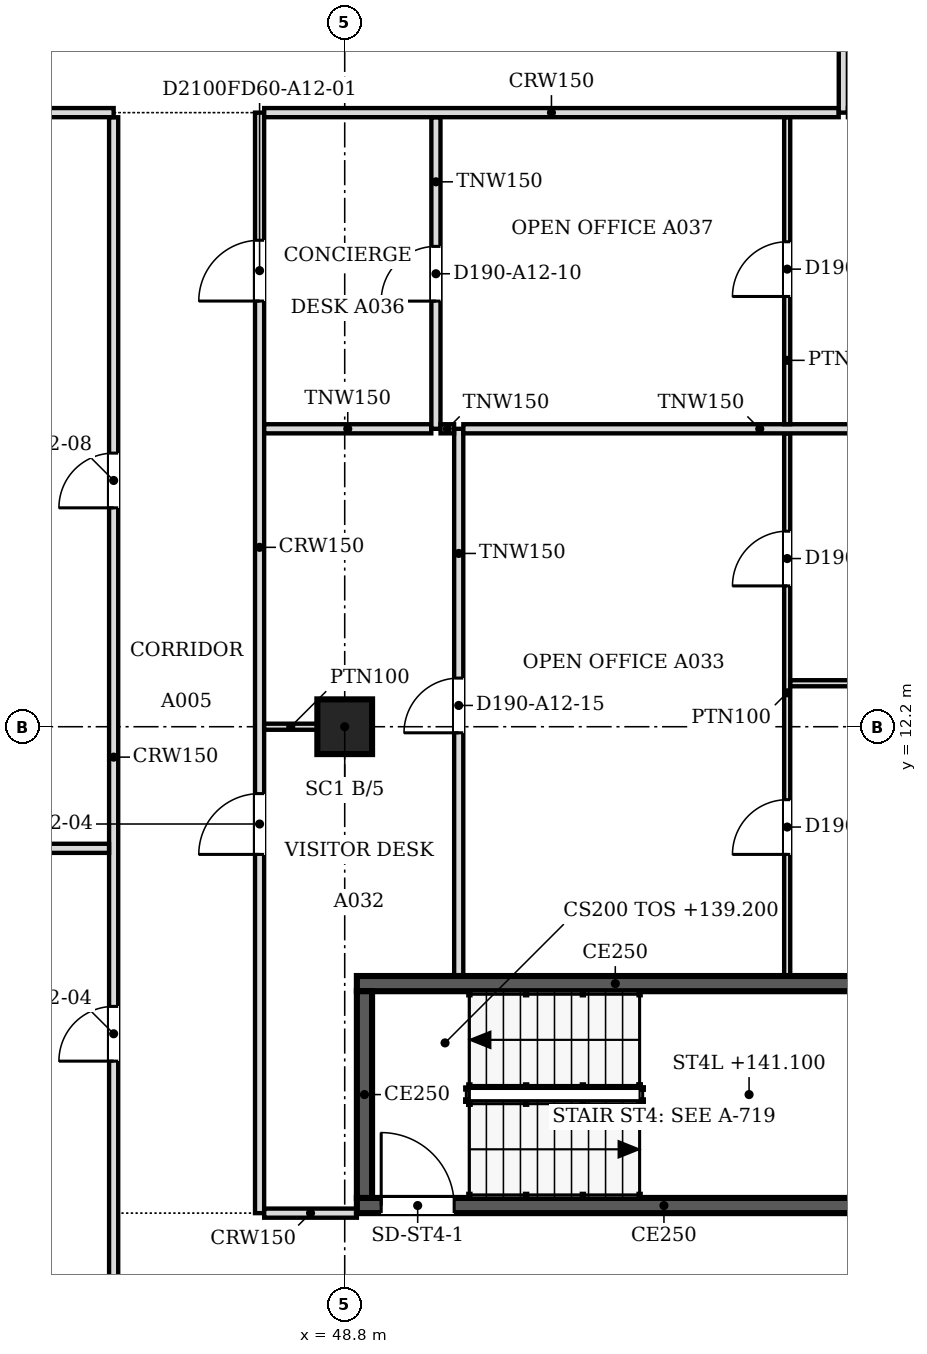
"""IFC4 building model, lengths in metres.
Left out: names, types, materials, properties, quantities, classifications, styles, units other than length and angle.
Written with IfcOpenShell. Run it as: python <this file> out.ifc"""

import sys

from ifc_helpers import new_model, si_unit, direction, frame, frame_2d, origin, origin_2d, place, context, subcontext, project, spatial, rectangle, extrude, source, transform, mapped, element, fill, save


model = new_model("IFC4")
c1 = context("Model", 3, precision=1e-05, world=origin(), true_north=direction((0.0, 1.0)))
c2 = subcontext(c1, "Body", "Model", "MODEL_VIEW")
j1 = project(units=[si_unit("LENGTHUNIT", "METRE"), si_unit("PLANEANGLEUNIT", "RADIAN")], contexts=[c1])
p1 = place(None, origin())
s1 = spatial("IfcSite", under=j1, at=p1, CompositionType="ELEMENT")
p2 = place(p1, origin())
s2 = spatial("IfcBuilding", under=s1, at=p2, CompositionType="ELEMENT")
p3 = place(p2, frame((0.0, 0.0, 139.2)))
s3 = spatial("IfcBuildingStorey", under=s2, at=p3, CompositionType="ELEMENT", Elevation=139.2)
p4 = place(p3, frame((48.8, 12.2, 0.0), z_axis=(0.0, 0.0, 1.0), x_axis=(1.0, 0.0, 0.0)))
e1 = element("IfcColumn", 1, at=p4, inside=s3, PredefinedType="COLUMN", context=c2, shape_type="SweptSolid", body=[
    extrude(rectangle(XDim=0.9, YDim=0.9, at=origin_2d()), origin(), (0.0, 0.0, 1.0), 3.6),
])
p5 = place(p3, frame((57.5, 4.325, 0.0), z_axis=(0.0, 0.0, 1.0), x_axis=(-1.0, 0.0, 0.0)))
e2 = element("IfcWall", 2, at=p5, inside=s3, PredefinedType="SOLIDWALL", context=c2, shape_type="SweptSolid", body=[
    extrude(rectangle(XDim=8.5, YDim=0.25, at=frame_2d((4.25, 0.0))), origin(), (0.0, 0.0, 1.0), 3.8),
])
m1 = source(origin(), c2, "Body", "SweptSolid", [
    extrude(rectangle(XDim=1.2, YDim=2.1, at=frame_2d((0.6, 1.05))), frame((0.0, 0.135, 0.0), z_axis=(0.0, -1.0, 0.0), x_axis=(1.0, 0.0, 0.0)), (0.0, 0.0, 1.0), 0.27),
])
p6 = place(p5, frame((6.9, 0.0, 0.0)))
e3 = element("IfcOpeningElement", 3, at=p6, cuts=e2, PredefinedType="OPENING", context=c2, shape_type="MappedRepresentation", body=[
    mapped(m1, transform((0.0, 0.0, 0.0), scale=1.0)),
])
p7 = place(p3, frame((49.125, 4.45, 0.0), z_axis=(0.0, 0.0, 1.0), x_axis=(0.0, 1.0, 0.0)))
e4 = element("IfcWall", 4, at=p7, inside=s3, PredefinedType="SOLIDWALL", context=c2, shape_type="SweptSolid", body=[
    extrude(rectangle(XDim=3.4, YDim=0.25, at=frame_2d((1.7, 0.0))), origin(), (0.0, 0.0, 1.0), 3.8),
])
p8 = place(p3, frame((49.0, 7.975, 0.0), z_axis=(0.0, 0.0, 1.0), x_axis=(1.0, 0.0, 0.0)))
e5 = element("IfcWall", 5, at=p8, inside=s3, PredefinedType="SOLIDWALL", context=c2, shape_type="SweptSolid", body=[
    extrude(rectangle(XDim=8.5, YDim=0.25, at=frame_2d((4.25, 0.0))), origin(), (0.0, 0.0, 1.0), 3.8),
])
p9 = place(p3, frame((45.0, 0.5, 0.0), z_axis=(0.0, 0.0, 1.0), x_axis=(0.0, 1.0, 0.0)))
e6 = element("IfcWall", 6, at=p9, inside=s3, PredefinedType="PARTITIONING", context=c2, shape_type="SweptSolid", body=[
    extrude(rectangle(XDim=21.724, YDim=0.15, at=frame_2d((10.862, 0.0))), origin(), (0.0, 0.0, 1.0), 3.067),
])
m2 = source(origin(), c2, "Body", "SweptSolid", [
    extrude(rectangle(XDim=0.9, YDim=2.1, at=frame_2d((0.45, 1.05))), frame((0.0, 0.085, 0.0), z_axis=(0.0, -1.0, 0.0), x_axis=(1.0, 0.0, 0.0)), (0.0, 0.0, 1.0), 0.17),
])
p10 = place(p9, frame((6.2, 0.0, 0.0)))
e7 = element("IfcOpeningElement", 7, at=p10, cuts=e6, PredefinedType="OPENING", context=c2, shape_type="MappedRepresentation", body=[
    mapped(m2, transform((0.0, 0.0, 0.0), scale=1.0)),
])
p11 = place(p9, frame((15.3, 0.0, 0.0)))
e8 = element("IfcOpeningElement", 8, at=p11, cuts=e6, PredefinedType="OPENING", context=c2, shape_type="MappedRepresentation", body=[
    mapped(m2, transform((0.0, 0.0, 0.0), scale=1.0)),
])
p12 = place(p3, frame((47.4, 22.3, 0.0), z_axis=(0.0, 0.0, 1.0), x_axis=(0.0, -1.0, 0.0)))
e9 = element("IfcWall", 9, at=p12, inside=s3, PredefinedType="PARTITIONING", context=c2, shape_type="SweptSolid", body=[
    extrude(rectangle(XDim=18.1, YDim=0.15, at=frame_2d((9.05, 0.0))), origin(), (0.0, 0.0, 1.0), 3.067),
])
m3 = source(origin(), c2, "Body", "SweptSolid", [
    extrude(rectangle(XDim=1.0, YDim=2.1, at=frame_2d((0.5, 1.05))), frame((0.0, 0.085, 0.0), z_axis=(0.0, -1.0, 0.0), x_axis=(1.0, 0.0, 0.0)), (0.0, 0.0, 1.0), 0.17),
])
p13 = place(p12, frame((2.099, 0.0, 0.0)))
e10 = element("IfcOpeningElement", 10, at=p13, cuts=e9, PredefinedType="OPENING", context=c2, shape_type="MappedRepresentation", body=[
    mapped(m3, transform((0.0, 0.0, 0.0), scale=1.0)),
])
p14 = place(p12, frame((11.2, 0.0, 0.0)))
e11 = element("IfcOpeningElement", 11, at=p14, cuts=e9, PredefinedType="OPENING", context=c2, shape_type="MappedRepresentation", body=[
    mapped(m3, transform((0.0, 0.0, 0.0), scale=1.0)),
])
p15 = place(p3, frame((47.476, 4.2, 0.0), z_axis=(0.0, 0.0, 1.0), x_axis=(1.0, 0.0, 0.0)))
e12 = element("IfcWall", 12, at=p15, inside=s3, PredefinedType="PARTITIONING", context=c2, shape_type="SweptSolid", body=[
    extrude(rectangle(XDim=1.524, YDim=0.15, at=frame_2d((0.762, 0.0))), origin(), (0.0, 0.0, 1.0), 3.067),
])
p16 = place(p3, frame((50.675, 17.1, 0.0), z_axis=(0.0, 0.0, 1.0), x_axis=(0.0, -1.0, 0.0)))
e13 = element("IfcWall", 13, at=p16, inside=s3, PredefinedType="PARTITIONING", context=c2, shape_type="SweptSolid", body=[
    extrude(rectangle(XDim=9.0, YDim=0.15, at=frame_2d((4.5, 0.0))), origin(), (0.0, 0.0, 1.0), 3.067),
])
p17 = place(p16, frame((4.1, 0.0, 0.0)))
e14 = element("IfcOpeningElement", 14, at=p17, cuts=e13, PredefinedType="OPENING", context=c2, shape_type="MappedRepresentation", body=[
    mapped(m2, transform((0.0, 0.0, 0.0), scale=1.0)),
])
p18 = place(p3, frame((56.077, 17.024, 0.0), z_axis=(0.0, 0.0, 1.0), x_axis=(0.0, -1.0, 0.0)))
e15 = element("IfcWall", 15, at=p18, inside=s3, PredefinedType="PARTITIONING", context=c2, shape_type="SweptSolid", body=[
    extrude(rectangle(XDim=8.924, YDim=0.1, at=frame_2d((4.462, 0.0))), origin(), (0.0, 0.0, 1.0), 3.067),
])
m4 = source(origin(), c2, "Body", "SweptSolid", [
    extrude(rectangle(XDim=0.9, YDim=2.1, at=frame_2d((0.45, 1.05))), frame((0.0, 0.06, 0.0), z_axis=(0.0, -1.0, 0.0), x_axis=(1.0, 0.0, 0.0)), (0.0, 0.0, 1.0), 0.12),
])
p19 = place(p18, frame((1.608, 0.0, 0.0)))
e16 = element("IfcOpeningElement", 16, at=p19, cuts=e15, PredefinedType="OPENING", context=c2, shape_type="MappedRepresentation", body=[
    mapped(m4, transform((0.0, 0.0, 0.0), scale=1.0)),
])
p20 = place(p18, frame((6.024, 0.0, 0.0)))
e17 = element("IfcOpeningElement", 17, at=p20, cuts=e15, PredefinedType="OPENING", context=c2, shape_type="MappedRepresentation", body=[
    mapped(m4, transform((0.0, 0.0, 0.0), scale=1.0)),
])
p21 = place(p3, frame((27.075, 10.2, 0.0), z_axis=(0.0, 0.0, 1.0), x_axis=(1.0, 0.0, 0.0)))
e18 = element("IfcWall", 18, at=p21, inside=s3, PredefinedType="PARTITIONING", context=c2, shape_type="SweptSolid", body=[
    extrude(rectangle(XDim=17.849, YDim=0.15, at=frame_2d((8.925, 0.0))), origin(), (0.0, 0.0, 1.0), 3.067),
])
p22 = place(p3, frame((48.35, 12.2, 0.0), z_axis=(0.0, 0.0, 1.0), x_axis=(-1.0, 0.0, 0.0)))
e19 = element("IfcWall", 19, at=p22, inside=s3, PredefinedType="PARTITIONING", context=c2, shape_type="SweptSolid", body=[
    extrude(rectangle(XDim=0.875, YDim=0.1, at=frame_2d((0.438, 0.0))), origin(), (0.0, 0.0, 1.0), 3.067),
])
p23 = place(p3, frame((56.128, 12.915, 0.0), z_axis=(0.0, 0.0, 1.0), x_axis=(1.0, 0.0, 0.0)))
e20 = element("IfcWall", 20, at=p23, inside=s3, PredefinedType="PARTITIONING", context=c2, shape_type="SweptSolid", body=[
    extrude(rectangle(XDim=4.372, YDim=0.1, at=frame_2d((2.186, 0.0))), origin(), (0.0, 0.0, 1.0), 3.067),
])
p24 = place(p3, frame((47.476, 17.1, 0.0), z_axis=(0.0, 0.0, 1.0), x_axis=(1.0, 0.0, 0.0)))
e21 = element("IfcWall", 21, at=p24, inside=s3, PredefinedType="PARTITIONING", context=c2, shape_type="SweptSolid", body=[
    extrude(rectangle(XDim=2.748, YDim=0.15, at=frame_2d((1.374, 0.0))), origin(), (0.0, 0.0, 1.0), 3.067),
])
p25 = place(p3, frame((50.3, 22.224, 0.0), z_axis=(0.0, 0.0, 1.0), x_axis=(0.0, -1.0, 0.0)))
e22 = element("IfcWall", 22, at=p25, inside=s3, PredefinedType="PARTITIONING", context=c2, shape_type="SweptSolid", body=[
    extrude(rectangle(XDim=5.124, YDim=0.15, at=frame_2d((2.562, 0.0))), origin(), (0.0, 0.0, 1.0), 3.067),
])
p26 = place(p25, frame((2.124, 0.0, 0.0)))
e23 = element("IfcOpeningElement", 23, at=p26, cuts=e22, PredefinedType="OPENING", context=c2, shape_type="MappedRepresentation", body=[
    mapped(m2, transform((0.0, 0.0, 0.0), scale=1.0)),
])
p27 = place(p3, frame((50.376, 17.1, 0.0), z_axis=(0.0, 0.0, 1.0), x_axis=(1.0, 0.0, 0.0)))
e24 = element("IfcWall", 24, at=p27, inside=s3, PredefinedType="PARTITIONING", context=c2, shape_type="SweptSolid", body=[
    extrude(rectangle(XDim=0.223, YDim=0.15, at=frame_2d((0.112, 0.0))), origin(), (0.0, 0.0, 1.0), 3.067),
])
p28 = place(p3, frame((50.751, 17.1, 0.0), z_axis=(0.0, 0.0, 1.0), x_axis=(1.0, 0.0, 0.0)))
e25 = element("IfcWall", 25, at=p28, inside=s3, PredefinedType="PARTITIONING", context=c2, shape_type="SweptSolid", body=[
    extrude(rectangle(XDim=9.749, YDim=0.15, at=frame_2d((4.875, 0.0))), origin(), (0.0, 0.0, 1.0), 3.067),
])
p29 = place(p3, frame((56.077, 22.224, 0.0), z_axis=(0.0, 0.0, 1.0), x_axis=(0.0, -1.0, 0.0)))
e26 = element("IfcWall", 26, at=p29, inside=s3, PredefinedType="PARTITIONING", context=c2, shape_type="SweptSolid", body=[
    extrude(rectangle(XDim=5.048, YDim=0.1, at=frame_2d((2.524, 0.0))), origin(), (0.0, 0.0, 1.0), 3.067),
])
p30 = place(p29, frame((2.048, 0.0, 0.0)))
e27 = element("IfcOpeningElement", 27, at=p30, cuts=e26, PredefinedType="OPENING", context=c2, shape_type="MappedRepresentation", body=[
    mapped(m4, transform((0.0, 0.0, 0.0), scale=1.0)),
])
p31 = place(p3, frame((30.5, 22.3, 0.0), z_axis=(0.0, 0.0, 1.0), x_axis=(1.0, 0.0, 0.0)))
e28 = element("IfcWall", 28, at=p31, inside=s3, PredefinedType="PARTITIONING", context=c2, shape_type="SweptSolid", body=[
    extrude(rectangle(XDim=14.5, YDim=0.15, at=frame_2d((7.25, 0.0))), origin(), (0.0, 0.0, 1.0), 3.067),
])
p32 = place(p3, frame((47.476, 22.3, 0.0), z_axis=(0.0, 0.0, 1.0), x_axis=(1.0, 0.0, 0.0)))
e29 = element("IfcWall", 29, at=p32, inside=s3, PredefinedType="PARTITIONING", context=c2, shape_type="SweptSolid", body=[
    extrude(rectangle(XDim=9.448, YDim=0.15, at=frame_2d((4.724, 0.0))), origin(), (0.0, 0.0, 1.0), 3.067),
])
p33 = place(p3, frame((57.0, 30.6, 0.0), z_axis=(0.0, 0.0, 1.0), x_axis=(0.0, -1.0, 0.0)))
e30 = element("IfcWall", 30, at=p33, inside=s3, PredefinedType="PARTITIONING", context=c2, shape_type="SweptSolid", body=[
    extrude(rectangle(XDim=8.3, YDim=0.15, at=frame_2d((4.15, 0.0))), origin(), (0.0, 0.0, 1.0), 3.067),
])
p34 = place(p33, frame((3.7, 0.0, 0.0)))
e31 = element("IfcOpeningElement", 31, at=p34, cuts=e30, PredefinedType="OPENING", context=c2, shape_type="MappedRepresentation", body=[
    mapped(m2, transform((0.0, 0.0, 0.0), scale=1.0)),
])
p35 = place(p3, frame((57.076, 22.3, 0.0), z_axis=(0.0, 0.0, 1.0), x_axis=(1.0, 0.0, 0.0)))
e32 = element("IfcWall", 32, at=p35, inside=s3, PredefinedType="PARTITIONING", context=c2, shape_type="SweptSolid", body=[
    extrude(rectangle(XDim=3.424, YDim=0.15, at=frame_2d((1.712, 0.0))), origin(), (0.0, 0.0, 1.0), 3.067),
])
m5 = source(origin(), c2, "Body", "SweptSolid", [
    extrude(rectangle(XDim=1.2, YDim=2.1, at=frame_2d((0.6, 1.05))), frame((0.0, 0.025, 0.0), z_axis=(0.0, -1.0, 0.0), x_axis=(1.0, 0.0, 0.0)), (0.0, 0.0, 1.0), 0.05),
])
p36 = place(p6, origin())
e33 = element("IfcDoor", 33, at=p36, inside=s3, OperationType="SINGLE_SWING_RIGHT", PredefinedType="DOOR", context=c2, shape_type="MappedRepresentation", body=[
    mapped(m5, transform((0.0, 0.0, 0.0), scale=1.0)),
])
fill(e3, e33)
m6 = source(origin(), c2, "Body", "SweptSolid", [
    extrude(rectangle(XDim=0.9, YDim=2.1, at=frame_2d((0.45, 1.05))), frame((0.0, 0.025, 0.0), z_axis=(0.0, -1.0, 0.0), x_axis=(1.0, 0.0, 0.0)), (0.0, 0.0, 1.0), 0.05),
])
p37 = place(p19, origin())
e34 = element("IfcDoor", 34, at=p37, inside=s3, OperationType="SINGLE_SWING_RIGHT", PredefinedType="DOOR", context=c2, shape_type="MappedRepresentation", body=[
    mapped(m6, transform((0.0, 0.0, 0.0), scale=1.0)),
])
fill(e16, e34)
p38 = place(p20, origin())
e35 = element("IfcDoor", 35, at=p38, inside=s3, OperationType="SINGLE_SWING_RIGHT", PredefinedType="DOOR", context=c2, shape_type="MappedRepresentation", body=[
    mapped(m6, transform((0.0, 0.0, 0.0), scale=1.0)),
])
fill(e17, e35)
p39 = place(p30, origin())
e36 = element("IfcDoor", 36, at=p39, inside=s3, OperationType="SINGLE_SWING_RIGHT", PredefinedType="DOOR", context=c2, shape_type="MappedRepresentation", body=[
    mapped(m6, transform((0.0, 0.0, 0.0), scale=1.0)),
])
fill(e27, e36)
p40 = place(p26, origin())
e37 = element("IfcDoor", 37, at=p40, inside=s3, OperationType="SINGLE_SWING_RIGHT", PredefinedType="DOOR", context=c2, shape_type="MappedRepresentation", body=[
    mapped(m6, transform((0.0, 0.0, 0.0), scale=1.0)),
])
fill(e23, e37)
m7 = source(origin(), c2, "Body", "SweptSolid", [
    extrude(rectangle(XDim=1.0, YDim=2.1, at=frame_2d((0.5, 1.05))), frame((0.0, 0.025, 0.0), z_axis=(0.0, -1.0, 0.0), x_axis=(1.0, 0.0, 0.0)), (0.0, 0.0, 1.0), 0.05),
])
p41 = place(p13, origin())
e38 = element("IfcDoor", 38, at=p41, inside=s3, OperationType="SINGLE_SWING_RIGHT", PredefinedType="DOOR", context=c2, shape_type="MappedRepresentation", body=[
    mapped(m7, transform((0.0, 0.0, 0.0), scale=1.0)),
])
fill(e10, e38)
p42 = place(p10, origin())
e39 = element("IfcDoor", 39, at=p42, inside=s3, OperationType="SINGLE_SWING_LEFT", PredefinedType="DOOR", context=c2, shape_type="MappedRepresentation", body=[
    mapped(m6, transform((0.0, 0.0, 0.0), scale=1.0)),
])
fill(e7, e39)
p43 = place(p17, origin())
e40 = element("IfcDoor", 40, at=p43, inside=s3, OperationType="SINGLE_SWING_RIGHT", PredefinedType="DOOR", context=c2, shape_type="MappedRepresentation", body=[
    mapped(m6, transform((0.0, 0.0, 0.0), scale=1.0)),
])
fill(e14, e40)
p44 = place(p11, origin())
e41 = element("IfcDoor", 41, at=p44, inside=s3, OperationType="SINGLE_SWING_LEFT", PredefinedType="DOOR", context=c2, shape_type="MappedRepresentation", body=[
    mapped(m6, transform((0.0, 0.0, 0.0), scale=1.0)),
])
fill(e8, e41)
p45 = place(p14, origin())
e42 = element("IfcDoor", 42, at=p45, inside=s3, OperationType="SINGLE_SWING_RIGHT", PredefinedType="DOOR", context=c2, shape_type="MappedRepresentation", body=[
    mapped(m7, transform((0.0, 0.0, 0.0), scale=1.0)),
])
fill(e11, e42)
save(model, sys.argv[1])
